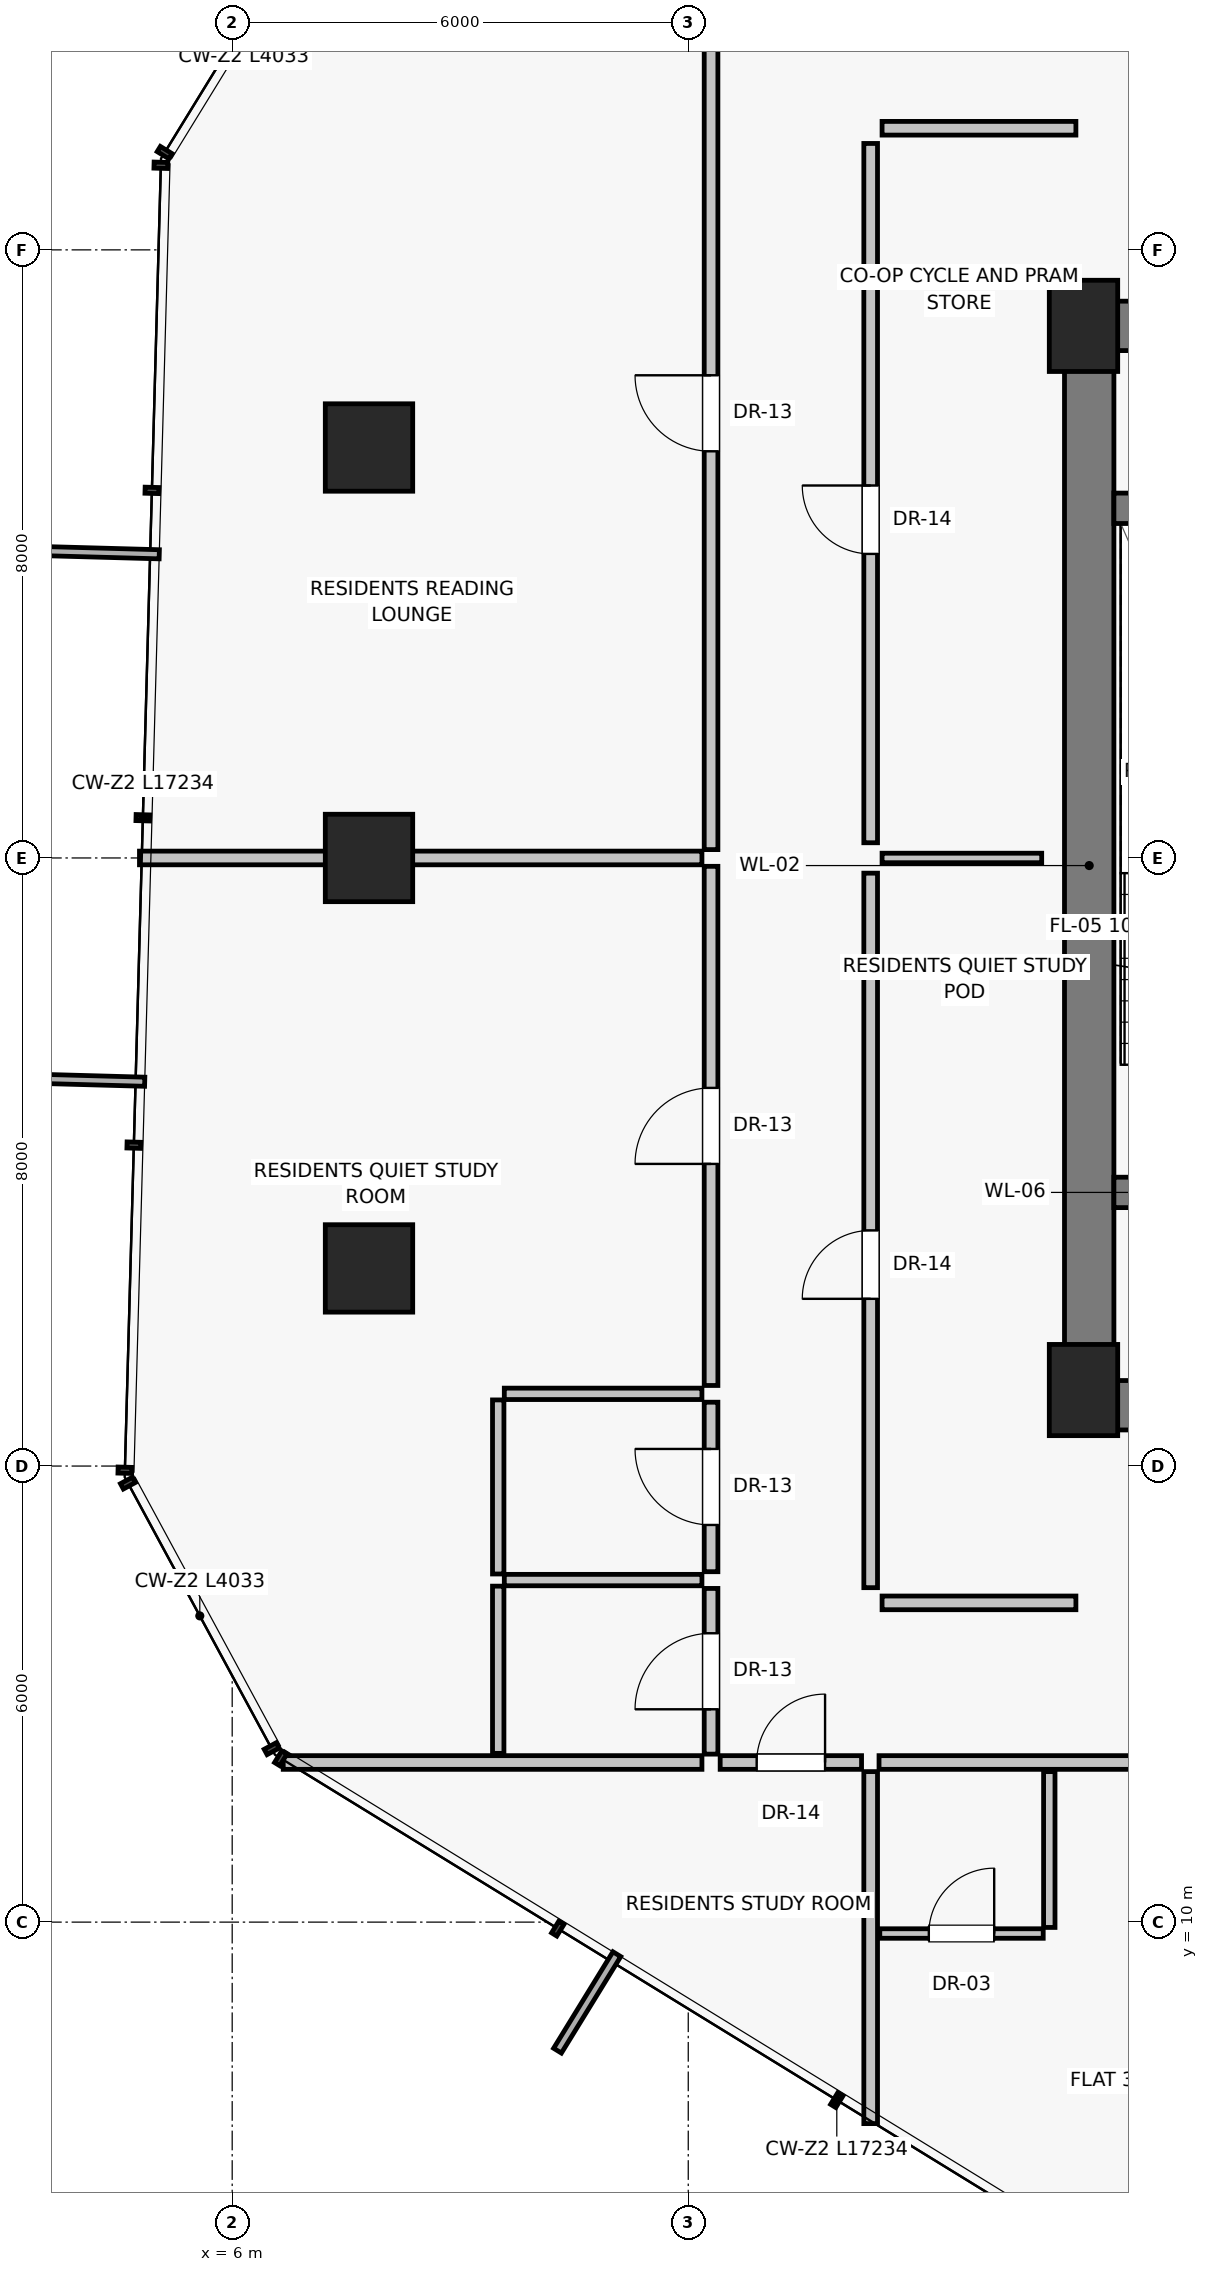
"""IFC4 building model, lengths in metres.
Left out: names, types, materials, properties, quantities, classifications, styles, units other than length and angle.
Written with IfcOpenShell. Run it as: python <this file> out.ifc"""

import sys

from ifc_helpers import new_model, si_unit, direction, frame, frame_2d, origin, origin_2d, place, context, subcontext, project, spatial, rectangle, extrude, source, transform, mapped, element, fill, save


model = new_model("IFC4")
c1 = context("Model", 3, precision=1e-05, world=origin(), true_north=direction((0.0, 1.0)))
c2 = subcontext(c1, "Body", "Model", "MODEL_VIEW")
j1 = project(units=[si_unit("LENGTHUNIT", "METRE"), si_unit("PLANEANGLEUNIT", "RADIAN")], contexts=[c1])
p1 = place(None, origin())
s1 = spatial("IfcSite", under=j1, at=p1, CompositionType="ELEMENT")
p2 = place(p1, origin())
s2 = spatial("IfcBuilding", under=s1, at=p2, CompositionType="ELEMENT")
p3 = place(p2, frame((0.0, 0.0, 123.0)))
s3 = spatial("IfcBuildingStorey", under=s2, at=p3, CompositionType="ELEMENT", Elevation=123.0)
for number, where, z_axis, x_axis in (
    (1, (17.2, 17.0, 0.0), (0.0, 0.0, 1.0), (1.0, 0.0, 0.0)),
    (2, (17.2, 31.0, 0.0), (0.0, 0.0, 1.0), (1.0, 0.0, 0.0)),
):
    element("IfcColumn", number, at=place(p3, frame(where, z_axis=z_axis, x_axis=x_axis)), inside=s3, PredefinedType="PILASTER", context=c2, shape_type="SweptSolid", body=[
        extrude(rectangle(XDim=0.9, YDim=1.2, at=origin_2d()), origin(), (0.0, 0.0, 1.0), 3.25),
    ])
for number, where, z_axis, x_axis in (
    (3, (7.8, 29.4, 0.0), (0.0, 0.0, 1.0), (1.0, 0.0, 0.0)),
    (4, (7.8, 24.0, 0.0), (0.0, 0.0, 1.0), (1.0, 0.0, 0.0)),
    (5, (7.8, 18.6, 0.0), (0.0, 0.0, 1.0), (1.0, 0.0, 0.0)),
):
    element("IfcColumn", number, at=place(p3, frame(where, z_axis=z_axis, x_axis=x_axis)), inside=s3, PredefinedType="COLUMN", context=c2, shape_type="SweptSolid", body=[
        extrude(rectangle(XDim=1.15, YDim=1.15, at=origin_2d()), origin(), (0.0, 0.0, 1.0), 3.25),
    ])
p4 = place(p3, frame((17.275, 16.8, 0.0), z_axis=(0.0, 0.0, 1.0), x_axis=(0.0, 1.0, 0.0)))
e6 = element("IfcWall", 6, at=p4, inside=s3, PredefinedType="SHEAR", context=c2, shape_type="SweptSolid", body=[
    extrude(rectangle(XDim=14.2, YDim=0.65, at=frame_2d((7.1, 0.0))), origin(), (0.0, 0.0, 1.0), 3.0),
])
p5 = place(p3, frame((17.2, 16.8, 0.0), z_axis=(0.0, 0.0, 1.0), x_axis=(1.0, 0.0, 0.0)))
e7 = element("IfcWall", 7, at=p5, inside=s3, PredefinedType="SHEAR", context=c2, shape_type="SweptSolid", body=[
    extrude(rectangle(XDim=5.85, YDim=0.65, at=frame_2d((2.925, 0.0))), origin(), (0.0, 0.0, 1.0), 3.0),
])
p6 = place(p5, frame((1.15, 0.0, 0.0)))
e8 = element("IfcOpeningElement", 8, at=p6, cuts=e7, PredefinedType="OPENING", context=c2, shape_type="SweptSolid", body=[
    extrude(rectangle(XDim=1.2, YDim=2.03, at=frame_2d((0.6, 1.015))), frame((0.0, 0.335, 0.0), z_axis=(0.0, -1.0, 0.0), x_axis=(1.0, 0.0, 0.0)), (0.0, 0.0, 1.0), 0.67),
])
p7 = place(p3, frame((17.2, 31.0, 0.0), z_axis=(0.0, 0.0, 1.0), x_axis=(1.0, 0.0, 0.0)))
e9 = element("IfcWall", 9, at=p7, inside=s3, PredefinedType="SHEAR", context=c2, shape_type="SweptSolid", body=[
    extrude(rectangle(XDim=3.8, YDim=0.65, at=frame_2d((1.9, 0.0))), origin(), (0.0, 0.0, 1.0), 3.0),
])
p8 = place(p7, frame((1.25, 0.0, 0.0)))
e10 = element("IfcOpeningElement", 10, at=p8, cuts=e9, PredefinedType="OPENING", context=c2, shape_type="SweptSolid", body=[
    extrude(rectangle(XDim=0.86, YDim=2.01, at=frame_2d((0.43, 1.005))), frame((0.0, 0.335, 0.0), z_axis=(0.0, -1.0, 0.0), x_axis=(1.0, 0.0, 0.0)), (0.0, 0.0, 1.0), 0.67),
])
p9 = place(p3, frame((17.6, 19.6, 0.0), z_axis=(0.0, 0.0, 1.0), x_axis=(1.0, 0.0, 0.0)))
e11 = element("IfcWall", 11, at=p9, inside=s3, PredefinedType="SHEAR", context=c2, shape_type="SweptSolid", body=[
    extrude(rectangle(XDim=3.4, YDim=0.4, at=frame_2d((1.7, 0.0))), origin(), (0.0, 0.0, 1.0), 3.0),
])
p10 = place(p9, frame((1.05, 0.0, 0.0)))
e12 = element("IfcOpeningElement", 12, at=p10, cuts=e11, PredefinedType="OPENING", context=c2, shape_type="SweptSolid", body=[
    extrude(rectangle(XDim=1.1, YDim=2.03, at=frame_2d((0.55, 1.015))), frame((0.0, 0.21, 0.0), z_axis=(0.0, -1.0, 0.0), x_axis=(1.0, 0.0, 0.0)), (0.0, 0.0, 1.0), 0.42),
])
p11 = place(p3, frame((17.6, 28.6, 0.0), z_axis=(0.0, 0.0, 1.0), x_axis=(1.0, 0.0, 0.0)))
e13 = element("IfcWall", 13, at=p11, inside=s3, PredefinedType="SHEAR", context=c2, shape_type="SweptSolid", body=[
    extrude(rectangle(XDim=3.4, YDim=0.4, at=frame_2d((1.7, 0.0))), origin(), (0.0, 0.0, 1.0), 3.0),
])
p12 = place(p3, frame((14.4, 14.4, 0.0), z_axis=(0.0, 0.0, 1.0), x_axis=(0.0, 1.0, 0.0)))
e14 = element("IfcWall", 14, at=p12, inside=s3, PredefinedType="PARTITIONING", context=c2, shape_type="SweptSolid", body=[
    extrude(rectangle(XDim=9.4, YDim=0.18, at=frame_2d((4.7, 0.0))), origin(), (0.0, 0.0, 1.0), 3.0),
])
p13 = place(p12, frame((3.8, 0.0, 0.0)))
e15 = element("IfcOpeningElement", 15, at=p13, cuts=e14, PredefinedType="OPENING", context=c2, shape_type="SweptSolid", body=[
    extrude(rectangle(XDim=0.9, YDim=2.01, at=frame_2d((0.45, 1.005))), frame((0.0, 0.1, 0.0), z_axis=(0.0, -1.0, 0.0), x_axis=(1.0, 0.0, 0.0)), (0.0, 0.0, 1.0), 0.2),
])
p14 = place(p3, frame((14.4, 24.2, 0.0), z_axis=(0.0, 0.0, 1.0), x_axis=(0.0, 1.0, 0.0)))
e16 = element("IfcWall", 16, at=p14, inside=s3, PredefinedType="PARTITIONING", context=c2, shape_type="SweptSolid", body=[
    extrude(rectangle(XDim=9.2, YDim=0.18, at=frame_2d((4.6, 0.0))), origin(), (0.0, 0.0, 1.0), 3.0),
])
p15 = place(p14, frame((3.8, 0.0, 0.0)))
e17 = element("IfcOpeningElement", 17, at=p15, cuts=e16, PredefinedType="OPENING", context=c2, shape_type="SweptSolid", body=[
    extrude(rectangle(XDim=0.9, YDim=2.01, at=frame_2d((0.45, 1.005))), frame((0.0, 0.1, 0.0), z_axis=(0.0, -1.0, 0.0), x_axis=(1.0, 0.0, 0.0)), (0.0, 0.0, 1.0), 0.2),
])
p16 = place(p3, frame((14.55, 24.0, 0.0), z_axis=(0.0, 0.0, 1.0), x_axis=(1.0, 0.0, 0.0)))
e18 = element("IfcWall", 18, at=p16, inside=s3, PredefinedType="PARTITIONING", context=c2, shape_type="SweptSolid", body=[
    extrude(rectangle(XDim=2.1, YDim=0.125, at=frame_2d((1.05, 0.0))), origin(), (0.0, 0.0, 1.0), 3.0),
])
for number, where, z_axis, x_axis in (
    (19, (14.55, 14.2, 0.0), (0.0, 0.0, 1.0), (1.0, 0.0, 0.0)),
    (20, (14.55, 33.6, 0.0), (0.0, 0.0, 1.0), (1.0, 0.0, 0.0)),
):
    element("IfcWall", number, at=place(p3, frame(where, z_axis=z_axis, x_axis=x_axis)), inside=s3, PredefinedType="PARTITIONING", context=c2, shape_type="SweptSolid", body=[
        extrude(rectangle(XDim=2.55, YDim=0.18, at=frame_2d((1.275, 0.0))), origin(), (0.0, 0.0, 1.0), 3.0),
    ])
p17 = place(p3, frame((14.4, 11.98, 0.0), z_axis=(0.0, 0.0, 1.0), x_axis=(0.0, -1.0, 0.0)))
e21 = element("IfcWall", 21, at=p17, inside=s3, PredefinedType="PARTITIONING", context=c2, shape_type="SweptSolid", body=[
    extrude(rectangle(XDim=4.631, YDim=0.18, at=frame_2d((2.315, 0.0))), origin(), (0.0, 0.0, 1.0), 3.0),
])
p18 = place(p3, frame((14.51, 12.1, 0.0), z_axis=(0.0, 0.0, 1.0), x_axis=(1.0, 0.0, 0.0)))
e22 = element("IfcWall", 22, at=p18, inside=s3, PredefinedType="PARTITIONING", context=c2, shape_type="SweptSolid", body=[
    extrude(rectangle(XDim=5.876, YDim=0.18, at=frame_2d((2.938, 0.0))), origin(), (0.0, 0.0, 1.0), 2.58),
])
p19 = place(p18, frame((3.549, 0.0, 0.0)))
e23 = element("IfcOpeningElement", 23, at=p19, cuts=e22, PredefinedType="OPENING", context=c2, shape_type="SweptSolid", body=[
    extrude(rectangle(XDim=0.95, YDim=2.02, at=frame_2d((0.475, 1.01))), frame((0.0, 0.1, 0.0), z_axis=(0.0, -1.0, 0.0), x_axis=(1.0, 0.0, 0.0)), (0.0, 0.0, 1.0), 0.2),
])
p20 = place(p3, frame((16.75, 11.98, 0.0), z_axis=(0.0, 0.0, 1.0), x_axis=(0.0, -1.0, 0.0)))
e24 = element("IfcWall", 24, at=p20, inside=s3, PredefinedType="PARTITIONING", context=c2, shape_type="SweptSolid", body=[
    extrude(rectangle(XDim=2.05, YDim=0.15, at=frame_2d((1.025, 0.0))), origin(), (0.0, 0.0, 1.0), 3.0),
])
p21 = place(p3, frame((14.52, 9.85, 0.0), z_axis=(0.0, 0.0, 1.0), x_axis=(1.0, 0.0, 0.0)))
e25 = element("IfcWall", 25, at=p21, inside=s3, PredefinedType="PARTITIONING", context=c2, shape_type="SweptSolid", body=[
    extrude(rectangle(XDim=2.15, YDim=0.125, at=frame_2d((1.075, 0.0))), origin(), (0.0, 0.0, 1.0), 3.0),
])
p22 = place(p21, frame((0.645, 0.0, 0.0)))
e26 = element("IfcOpeningElement", 26, at=p22, cuts=e25, PredefinedType="OPENING", context=c2, shape_type="SweptSolid", body=[
    extrude(rectangle(XDim=0.86, YDim=2.01, at=frame_2d((0.43, 1.005))), frame((0.0, 0.073, 0.0), z_axis=(0.0, -1.0, 0.0), x_axis=(1.0, 0.0, 0.0)), (0.0, 0.0, 1.0), 0.145),
])
p23 = place(p3, frame((12.18, 12.1, 0.0), z_axis=(0.0, 0.0, 1.0), x_axis=(-1.0, 0.0, 0.0)))
e27 = element("IfcWall", 27, at=p23, inside=s3, PredefinedType="PARTITIONING", context=c2, shape_type="SweptSolid", body=[
    extrude(rectangle(XDim=5.509, YDim=0.18, at=frame_2d((2.754, 0.0))), origin(), (0.0, 0.0, 1.0), 3.0),
])
p24 = place(p3, frame((12.3, 12.21, 0.0), z_axis=(0.0, 0.0, 1.0), x_axis=(0.0, 1.0, 0.0)))
e28 = element("IfcWall", 28, at=p24, inside=s3, PredefinedType="PARTITIONING", context=c2, shape_type="SweptSolid", body=[
    extrude(rectangle(XDim=2.18, YDim=0.18, at=frame_2d((1.09, 0.0))), origin(), (0.0, 0.0, 1.0), 3.0),
])
p25 = place(p24, frame((0.59, 0.0, 0.0)))
e29 = element("IfcOpeningElement", 29, at=p25, cuts=e28, PredefinedType="OPENING", context=c2, shape_type="SweptSolid", body=[
    extrude(rectangle(XDim=1.0, YDim=2.01, at=frame_2d((0.5, 1.005))), frame((0.0, 0.1, 0.0), z_axis=(0.0, -1.0, 0.0), x_axis=(1.0, 0.0, 0.0)), (0.0, 0.0, 1.0), 0.2),
])
p26 = place(p3, frame((12.3, 14.61, 0.0), z_axis=(0.0, 0.0, 1.0), x_axis=(0.0, 1.0, 0.0)))
e30 = element("IfcWall", 30, at=p26, inside=s3, PredefinedType="PARTITIONING", context=c2, shape_type="SweptSolid", body=[
    extrude(rectangle(XDim=2.23, YDim=0.18, at=frame_2d((1.115, 0.0))), origin(), (0.0, 0.0, 1.0), 3.0),
])
p27 = place(p26, frame((0.615, 0.0, 0.0)))
e31 = element("IfcOpeningElement", 31, at=p27, cuts=e30, PredefinedType="OPENING", context=c2, shape_type="SweptSolid", body=[
    extrude(rectangle(XDim=1.0, YDim=2.01, at=frame_2d((0.5, 1.005))), frame((0.0, 0.1, 0.0), z_axis=(0.0, -1.0, 0.0), x_axis=(1.0, 0.0, 0.0)), (0.0, 0.0, 1.0), 0.2),
])
p28 = place(p3, frame((12.3, 17.06, 0.0), z_axis=(0.0, 0.0, 1.0), x_axis=(0.0, 1.0, 0.0)))
e32 = element("IfcWall", 32, at=p28, inside=s3, PredefinedType="PARTITIONING", context=c2, shape_type="SweptSolid", body=[
    extrude(rectangle(XDim=6.83, YDim=0.18, at=frame_2d((3.415, 0.0))), origin(), (0.0, 0.0, 1.0), 2.58),
])
p29 = place(p28, frame((2.915, 0.0, 0.0)))
e33 = element("IfcOpeningElement", 33, at=p29, cuts=e32, PredefinedType="OPENING", context=c2, shape_type="SweptSolid", body=[
    extrude(rectangle(XDim=1.0, YDim=2.01, at=frame_2d((0.5, 1.005))), frame((0.0, 0.1, 0.0), z_axis=(0.0, -1.0, 0.0), x_axis=(1.0, 0.0, 0.0)), (0.0, 0.0, 1.0), 0.2),
])
p30 = place(p3, frame((12.3, 24.11, 0.0), z_axis=(0.0, 0.0, 1.0), x_axis=(0.0, 1.0, 0.0)))
e34 = element("IfcWall", 34, at=p30, inside=s3, PredefinedType="PARTITIONING", context=c2, shape_type="SweptSolid", body=[
    extrude(rectangle(XDim=11.48, YDim=0.18, at=frame_2d((5.74, 0.0))), origin(), (0.0, 0.0, 1.0), 2.58),
])
p31 = place(p30, frame((5.24, 0.0, 0.0)))
e35 = element("IfcOpeningElement", 35, at=p31, cuts=e34, PredefinedType="OPENING", context=c2, shape_type="SweptSolid", body=[
    extrude(rectangle(XDim=1.0, YDim=2.01, at=frame_2d((0.5, 1.005))), frame((0.0, 0.1, 0.0), z_axis=(0.0, -1.0, 0.0), x_axis=(1.0, 0.0, 0.0)), (0.0, 0.0, 1.0), 0.2),
])
for number, where, z_axis, x_axis in (
    (36, (12.18, 14.5, 0.0), (0.0, 0.0, 1.0), (-1.0, 0.0, 0.0)),
    (37, (12.18, 16.95, 0.0), (0.0, 0.0, 1.0), (-1.0, 0.0, 0.0)),
):
    element("IfcWall", number, at=place(p3, frame(where, z_axis=z_axis, x_axis=x_axis)), inside=s3, PredefinedType="PARTITIONING", context=c2, shape_type="SweptSolid", body=[
        extrude(rectangle(XDim=2.6, YDim=0.15, at=frame_2d((1.3, 0.0))), origin(), (0.0, 0.0, 1.0), 3.0),
    ])
p32 = place(p3, frame((9.5, 12.22, 0.0), z_axis=(0.0, 0.0, 1.0), x_axis=(0.0, 1.0, 0.0)))
e38 = element("IfcWall", 38, at=p32, inside=s3, PredefinedType="PARTITIONING", context=c2, shape_type="SweptSolid", body=[
    extrude(rectangle(XDim=2.2, YDim=0.15, at=frame_2d((1.1, 0.0))), origin(), (0.0, 0.0, 1.0), 3.0),
])
p33 = place(p3, frame((9.5, 14.58, 0.0), z_axis=(0.0, 0.0, 1.0), x_axis=(0.0, 1.0, 0.0)))
e39 = element("IfcWall", 39, at=p33, inside=s3, PredefinedType="PARTITIONING", context=c2, shape_type="SweptSolid", body=[
    extrude(rectangle(XDim=2.29, YDim=0.15, at=frame_2d((1.145, 0.0))), origin(), (0.0, 0.0, 1.0), 3.0),
])
p34 = place(p3, frame((12.18, 24.0, 0.0), z_axis=(0.0, 0.0, 1.0), x_axis=(-1.0, 0.0, 0.0)))
e40 = element("IfcWall", 40, at=p34, inside=s3, PredefinedType="PARTITIONING", context=c2, shape_type="SweptSolid", body=[
    extrude(rectangle(XDim=7.4, YDim=0.18, at=frame_2d((3.7, 0.0))), origin(), (0.0, 0.0, 1.0), 3.0),
])
p35 = place(p3, frame((12.42, 12.1, 0.0), z_axis=(0.0, 0.0, 1.0), x_axis=(1.0, 0.0, 0.0)))
e41 = element("IfcWall", 41, at=p35, inside=s3, PredefinedType="PARTITIONING", context=c2, shape_type="SweptSolid", body=[
    extrude(rectangle(XDim=1.86, YDim=0.18, at=frame_2d((0.93, 0.0))), origin(), (0.0, 0.0, 1.0), 3.0),
])
p36 = place(p35, frame((0.48, 0.0, 0.0)))
e42 = element("IfcOpeningElement", 42, at=p36, cuts=e41, PredefinedType="OPENING", context=c2, shape_type="SweptSolid", body=[
    extrude(rectangle(XDim=0.9, YDim=2.01, at=frame_2d((0.45, 1.005))), frame((0.0, 0.1, 0.0), z_axis=(0.0, -1.0, 0.0), x_axis=(1.0, 0.0, 0.0)), (0.0, 0.0, 1.0), 0.2),
])
m1 = source(origin(), c2, "Body", "SweptSolid", [
    extrude(rectangle(XDim=0.9, YDim=2.01, at=frame_2d((0.45, 1.005))), frame((0.0, 0.025, 0.0), z_axis=(0.0, -1.0, 0.0), x_axis=(1.0, 0.0, 0.0)), (0.0, 0.0, 1.0), 0.05),
])
p37 = place(p13, origin())
e43 = element("IfcDoor", 43, at=p37, inside=s3, OperationType="SINGLE_SWING_LEFT", PredefinedType="DOOR", context=c2, shape_type="MappedRepresentation", body=[
    mapped(m1, transform((0.0, 0.0, 0.0), scale=1.0)),
])
fill(e15, e43)
p38 = place(p15, origin())
e44 = element("IfcDoor", 44, at=p38, inside=s3, OperationType="SINGLE_SWING_RIGHT", PredefinedType="DOOR", context=c2, shape_type="MappedRepresentation", body=[
    mapped(m1, transform((0.0, 0.0, 0.0), scale=1.0)),
])
fill(e17, e44)
m2 = source(origin(), c2, "Body", "SweptSolid", [
    extrude(rectangle(XDim=0.86, YDim=2.01, at=frame_2d((0.43, 1.005))), frame((0.0, 0.025, 0.0), z_axis=(0.0, -1.0, 0.0), x_axis=(1.0, 0.0, 0.0)), (0.0, 0.0, 1.0), 0.05),
])
p39 = place(p22, origin())
e45 = element("IfcDoor", 45, at=p39, inside=s3, OperationType="SINGLE_SWING_RIGHT", PredefinedType="DOOR", context=c2, shape_type="MappedRepresentation", body=[
    mapped(m2, transform((0.0, 0.0, 0.0), scale=1.0)),
])
fill(e26, e45)
m3 = source(origin(), c2, "Body", "SweptSolid", [
    extrude(rectangle(XDim=1.0, YDim=2.01, at=frame_2d((0.5, 1.005))), frame((0.0, 0.025, 0.0), z_axis=(0.0, -1.0, 0.0), x_axis=(1.0, 0.0, 0.0)), (0.0, 0.0, 1.0), 0.05),
])
p40 = place(p25, origin())
e46 = element("IfcDoor", 46, at=p40, inside=s3, OperationType="SINGLE_SWING_LEFT", PredefinedType="DOOR", context=c2, shape_type="MappedRepresentation", body=[
    mapped(m3, transform((0.0, 0.0, 0.0), scale=1.0)),
])
fill(e29, e46)
p41 = place(p27, origin())
e47 = element("IfcDoor", 47, at=p41, inside=s3, OperationType="SINGLE_SWING_RIGHT", PredefinedType="DOOR", context=c2, shape_type="MappedRepresentation", body=[
    mapped(m3, transform((0.0, 0.0, 0.0), scale=1.0)),
])
fill(e31, e47)
p42 = place(p29, origin())
e48 = element("IfcDoor", 48, at=p42, inside=s3, OperationType="SINGLE_SWING_LEFT", PredefinedType="DOOR", context=c2, shape_type="MappedRepresentation", body=[
    mapped(m3, transform((0.0, 0.0, 0.0), scale=1.0)),
])
fill(e33, e48)
p43 = place(p31, origin())
e49 = element("IfcDoor", 49, at=p43, inside=s3, OperationType="SINGLE_SWING_RIGHT", PredefinedType="DOOR", context=c2, shape_type="MappedRepresentation", body=[
    mapped(m3, transform((0.0, 0.0, 0.0), scale=1.0)),
])
fill(e35, e49)
p44 = place(p36, origin())
e50 = element("IfcDoor", 50, at=p44, inside=s3, OperationType="SINGLE_SWING_RIGHT", PredefinedType="DOOR", context=c2, shape_type="MappedRepresentation", body=[
    mapped(m1, transform((0.0, 0.0, 0.0), scale=1.0)),
])
fill(e42, e50)
save(model, sys.argv[1])
